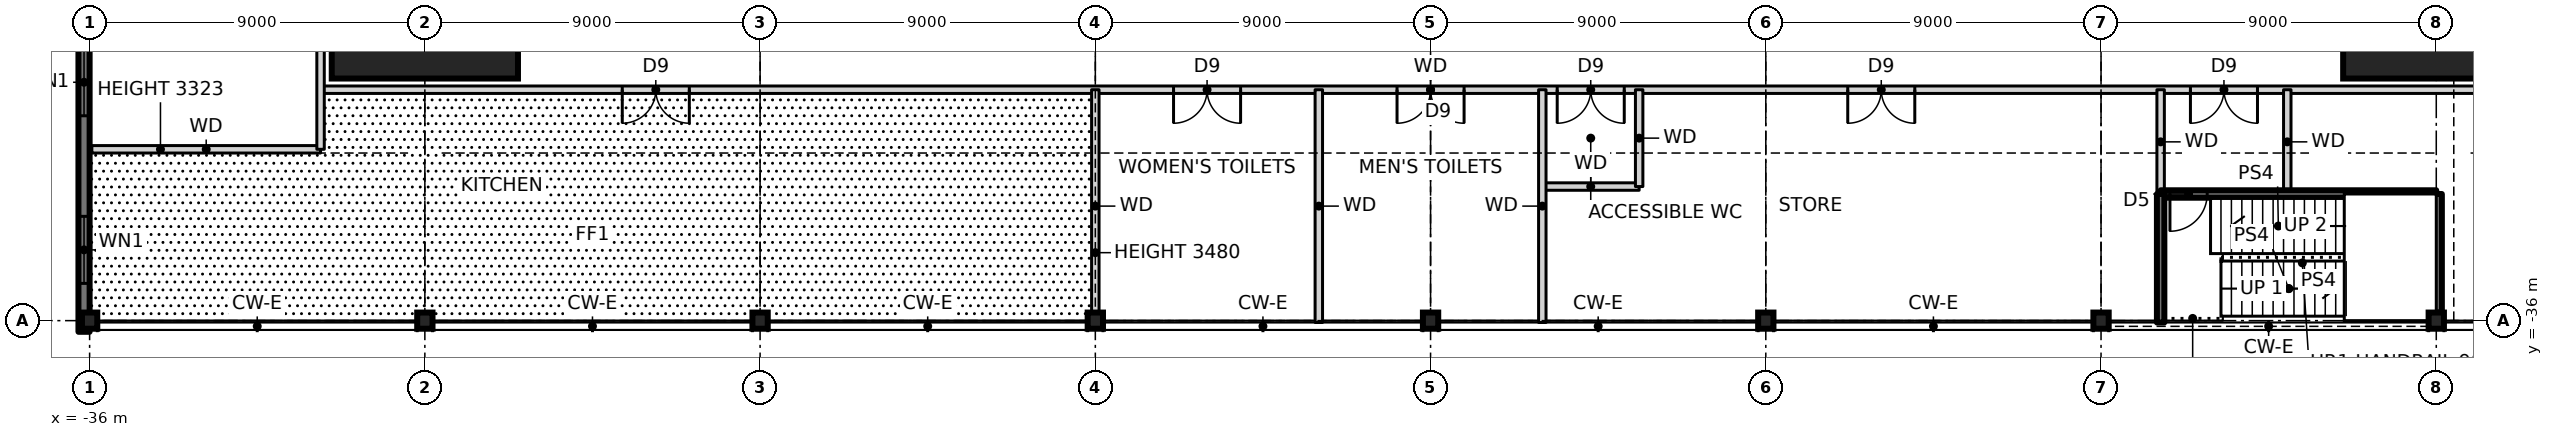
"""IFC4 building model, lengths in metres.
Left out: names, types, materials, properties, quantities, classifications, styles, units other than length and angle.
Written with IfcOpenShell. Run it as: python <this file> out.ifc"""

import sys

from ifc_helpers import new_model, si_unit, direction, frame, frame_2d, origin, origin_2d, place, context, subcontext, project, spatial, rectangle, i_section, extrude, element, fill, save


model = new_model("IFC4")
c1 = context("Model", 3, precision=1e-05, world=origin(), true_north=direction((0.0, 1.0)))
c2 = subcontext(c1, "Body", "Model", "MODEL_VIEW")
j1 = project(units=[si_unit("LENGTHUNIT", "METRE"), si_unit("PLANEANGLEUNIT", "RADIAN")], contexts=[c1])
p1 = place(None, origin())
s1 = spatial("IfcSite", under=j1, at=p1, CompositionType="ELEMENT")
p2 = place(p1, origin())
s2 = spatial("IfcBuilding", under=s1, at=p2, CompositionType="ELEMENT")
p3 = place(p2, frame((0.0, 0.0, 6.0)))
s3 = spatial("IfcBuildingStorey", under=s2, at=p3, CompositionType="ELEMENT", Elevation=6.0)
for number, where, z_axis, x_axis in (
    (1, (-27.0, -27.0, 0.0), (0.0, 0.0, 1.0), (1.0, 0.0, 0.0)),
    (2, (27.0, -27.0, 0.0), (0.0, 0.0, 1.0), (1.0, 0.0, 0.0)),
):
    element("IfcColumn", number, at=place(p3, frame(where, z_axis=z_axis, x_axis=x_axis)), inside=s3, PredefinedType="COLUMN", context=c2, shape_type="SweptSolid", body=[
        extrude(rectangle(XDim=5.0, YDim=5.0, at=origin_2d()), origin(), (0.0, 0.0, 1.0), 4.5),
        extrude(i_section(OverallWidth=0.478, OverallDepth=0.599, WebThickness=0.1, FlangeThickness=0.14, at=origin_2d()), origin(), (0.0, 0.0, 1.0), 4.5),
    ])
for number, where, z_axis, x_axis in (
    (3, (-36.0, -36.0, 0.0), (0.0, 0.0, 1.0), (1.0, 0.0, 0.0)),
    (4, (-27.0, -36.0, 0.0), (0.0, 0.0, 1.0), (1.0, 0.0, 0.0)),
    (5, (-18.0, -36.0, 0.0), (0.0, 0.0, 1.0), (1.0, 0.0, 0.0)),
    (6, (-9.0, -36.0, 0.0), (0.0, 0.0, 1.0), (1.0, 0.0, 0.0)),
    (7, (0.0, -36.0, 0.0), (0.0, 0.0, 1.0), (1.0, 0.0, 0.0)),
    (8, (9.0, -36.0, 0.0), (0.0, 0.0, 1.0), (1.0, 0.0, 0.0)),
    (9, (18.0, -36.0, 0.0), (0.0, 0.0, 1.0), (1.0, 0.0, 0.0)),
    (10, (27.0, -36.0, 0.0), (0.0, 0.0, 1.0), (1.0, 0.0, 0.0)),
):
    element("IfcColumn", number, at=place(p3, frame(where, z_axis=z_axis, x_axis=x_axis)), inside=s3, PredefinedType="COLUMN", context=c2, shape_type="SweptSolid", body=[
        extrude(i_section(OverallWidth=0.411, OverallDepth=0.434, WebThickness=0.036, FlangeThickness=0.057, at=origin_2d()), origin(), (0.0, 0.0, 1.0), 4.5),
    ])
p4 = place(p3, frame((-36.15, 36.3, -0.25), z_axis=(0.0, 0.0, 1.0), x_axis=(0.0, -1.0, 0.0)))
e11 = element("IfcWall", 11, at=p4, inside=s3, PredefinedType="SOLIDWALL", context=c2, shape_type="SweptSolid", body=[
    extrude(rectangle(XDim=72.6, YDim=0.3, at=frame_2d((36.3, 0.0))), origin(), (0.0, 0.0, 1.0), 3.73),
])
p5 = place(p4, frame((2.0, 0.0, 1.15)))
e12 = element("IfcOpeningElement", 12, at=p5, cuts=e11, PredefinedType="OPENING", context=c2, shape_type="SweptSolid", body=[
    extrude(rectangle(XDim=1.8, YDim=2.4, at=frame_2d((0.9, 1.2))), frame((0.0, 0.16, 0.0), z_axis=(0.0, -1.0, 0.0), x_axis=(1.0, 0.0, 0.0)), (0.0, 0.0, 1.0), 0.32),
])
p6 = place(p4, frame((6.5, 0.0, 1.15)))
e13 = element("IfcOpeningElement", 13, at=p6, cuts=e11, PredefinedType="OPENING", context=c2, shape_type="SweptSolid", body=[
    extrude(rectangle(XDim=1.8, YDim=2.4, at=frame_2d((0.9, 1.2))), frame((0.0, 0.16, 0.0), z_axis=(0.0, -1.0, 0.0), x_axis=(1.0, 0.0, 0.0)), (0.0, 0.0, 1.0), 0.32),
])
p7 = place(p4, frame((11.0, 0.0, 1.15)))
e14 = element("IfcOpeningElement", 14, at=p7, cuts=e11, PredefinedType="OPENING", context=c2, shape_type="SweptSolid", body=[
    extrude(rectangle(XDim=1.8, YDim=2.4, at=frame_2d((0.9, 1.2))), frame((0.0, 0.16, 0.0), z_axis=(0.0, -1.0, 0.0), x_axis=(1.0, 0.0, 0.0)), (0.0, 0.0, 1.0), 0.32),
])
p8 = place(p4, frame((15.5, 0.0, 1.15)))
e15 = element("IfcOpeningElement", 15, at=p8, cuts=e11, PredefinedType="OPENING", context=c2, shape_type="SweptSolid", body=[
    extrude(rectangle(XDim=1.8, YDim=2.4, at=frame_2d((0.9, 1.2))), frame((0.0, 0.16, 0.0), z_axis=(0.0, -1.0, 0.0), x_axis=(1.0, 0.0, 0.0)), (0.0, 0.0, 1.0), 0.32),
])
p9 = place(p4, frame((20.0, 0.0, 1.15)))
e16 = element("IfcOpeningElement", 16, at=p9, cuts=e11, PredefinedType="OPENING", context=c2, shape_type="SweptSolid", body=[
    extrude(rectangle(XDim=1.8, YDim=2.4, at=frame_2d((0.9, 1.2))), frame((0.0, 0.16, 0.0), z_axis=(0.0, -1.0, 0.0), x_axis=(1.0, 0.0, 0.0)), (0.0, 0.0, 1.0), 0.32),
])
p10 = place(p4, frame((24.5, 0.0, 1.15)))
e17 = element("IfcOpeningElement", 17, at=p10, cuts=e11, PredefinedType="OPENING", context=c2, shape_type="SweptSolid", body=[
    extrude(rectangle(XDim=1.8, YDim=2.4, at=frame_2d((0.9, 1.2))), frame((0.0, 0.16, 0.0), z_axis=(0.0, -1.0, 0.0), x_axis=(1.0, 0.0, 0.0)), (0.0, 0.0, 1.0), 0.32),
])
p11 = place(p4, frame((29.0, 0.0, 1.15)))
e18 = element("IfcOpeningElement", 18, at=p11, cuts=e11, PredefinedType="OPENING", context=c2, shape_type="SweptSolid", body=[
    extrude(rectangle(XDim=1.8, YDim=2.4, at=frame_2d((0.9, 1.2))), frame((0.0, 0.16, 0.0), z_axis=(0.0, -1.0, 0.0), x_axis=(1.0, 0.0, 0.0)), (0.0, 0.0, 1.0), 0.32),
])
p12 = place(p4, frame((42.5, 0.0, 1.15)))
e19 = element("IfcOpeningElement", 19, at=p12, cuts=e11, PredefinedType="OPENING", context=c2, shape_type="SweptSolid", body=[
    extrude(rectangle(XDim=1.8, YDim=2.4, at=frame_2d((0.9, 1.2))), frame((0.0, 0.16, 0.0), z_axis=(0.0, -1.0, 0.0), x_axis=(1.0, 0.0, 0.0)), (0.0, 0.0, 1.0), 0.32),
])
p13 = place(p4, frame((47.0, 0.0, 1.15)))
e20 = element("IfcOpeningElement", 20, at=p13, cuts=e11, PredefinedType="OPENING", context=c2, shape_type="SweptSolid", body=[
    extrude(rectangle(XDim=1.8, YDim=2.4, at=frame_2d((0.9, 1.2))), frame((0.0, 0.16, 0.0), z_axis=(0.0, -1.0, 0.0), x_axis=(1.0, 0.0, 0.0)), (0.0, 0.0, 1.0), 0.32),
])
p14 = place(p4, frame((51.5, 0.0, 1.15)))
e21 = element("IfcOpeningElement", 21, at=p14, cuts=e11, PredefinedType="OPENING", context=c2, shape_type="SweptSolid", body=[
    extrude(rectangle(XDim=1.8, YDim=2.4, at=frame_2d((0.9, 1.2))), frame((0.0, 0.16, 0.0), z_axis=(0.0, -1.0, 0.0), x_axis=(1.0, 0.0, 0.0)), (0.0, 0.0, 1.0), 0.32),
])
p15 = place(p4, frame((56.0, 0.0, 1.15)))
e22 = element("IfcOpeningElement", 22, at=p15, cuts=e11, PredefinedType="OPENING", context=c2, shape_type="SweptSolid", body=[
    extrude(rectangle(XDim=1.8, YDim=2.4, at=frame_2d((0.9, 1.2))), frame((0.0, 0.16, 0.0), z_axis=(0.0, -1.0, 0.0), x_axis=(1.0, 0.0, 0.0)), (0.0, 0.0, 1.0), 0.32),
])
p16 = place(p4, frame((60.5, 0.0, 1.15)))
e23 = element("IfcOpeningElement", 23, at=p16, cuts=e11, PredefinedType="OPENING", context=c2, shape_type="SweptSolid", body=[
    extrude(rectangle(XDim=1.8, YDim=2.4, at=frame_2d((0.9, 1.2))), frame((0.0, 0.16, 0.0), z_axis=(0.0, -1.0, 0.0), x_axis=(1.0, 0.0, 0.0)), (0.0, 0.0, 1.0), 0.32),
])
p17 = place(p4, frame((65.0, 0.0, 1.15)))
e24 = element("IfcOpeningElement", 24, at=p17, cuts=e11, PredefinedType="OPENING", context=c2, shape_type="SweptSolid", body=[
    extrude(rectangle(XDim=1.8, YDim=2.4, at=frame_2d((0.9, 1.2))), frame((0.0, 0.16, 0.0), z_axis=(0.0, -1.0, 0.0), x_axis=(1.0, 0.0, 0.0)), (0.0, 0.0, 1.0), 0.32),
])
p18 = place(p4, frame((69.5, 0.0, 1.15)))
e25 = element("IfcOpeningElement", 25, at=p18, cuts=e11, PredefinedType="OPENING", context=c2, shape_type="SweptSolid", body=[
    extrude(rectangle(XDim=1.8, YDim=2.4, at=frame_2d((0.9, 1.2))), frame((0.0, 0.16, 0.0), z_axis=(0.0, -1.0, 0.0), x_axis=(1.0, 0.0, 0.0)), (0.0, 0.0, 1.0), 0.32),
])
p19 = place(p2, origin())
s4 = spatial("IfcBuildingStorey", under=s2, at=p19, CompositionType="ELEMENT", Elevation=0.0)
p20 = place(p19, frame((27.506, -36.25, -0.15), z_axis=(0.0, 0.0, 1.0), x_axis=(0.0, -1.0, 0.0)))
e26 = element("IfcWall", 26, at=p20, inside=s4, PredefinedType="SOLIDWALL", context=c2, shape_type="SweptSolid", body=[
    extrude(rectangle(XDim=3.05, YDim=0.6, at=frame_2d((1.525, 0.0))), origin(), (0.0, 0.0, 1.0), 9.15),
])
p21 = place(p3, frame((19.6, -32.6, 0.0), z_axis=(0.0, 0.0, 1.0), x_axis=(1.0, 0.0, 0.0)))
e27 = element("IfcWall", 27, at=p21, inside=s3, PredefinedType="SOLIDWALL", context=c2, shape_type="SweptSolid", body=[
    extrude(rectangle(XDim=7.4, YDim=0.2, at=frame_2d((3.7, 0.0))), origin(), (0.0, 0.0, 1.0), 4.5),
])
p22 = place(p21, frame((0.25, 0.0, 0.0)))
e28 = element("IfcOpeningElement", 28, at=p22, cuts=e27, PredefinedType="OPENING", context=c2, shape_type="SweptSolid", body=[
    extrude(rectangle(XDim=1.0, YDim=2.1, at=frame_2d((0.5, 1.05))), frame((0.0, 0.11, 0.0), z_axis=(0.0, -1.0, 0.0), x_axis=(1.0, 0.0, 0.0)), (0.0, 0.0, 1.0), 0.22),
])
p23 = place(p3, frame((3.0, -32.4, 0.0), z_axis=(0.0, 0.0, 1.0), x_axis=(1.0, 0.0, 0.0)))
e29 = element("IfcWall", 29, at=p23, inside=s3, PredefinedType="SOLIDWALL", context=c2, shape_type="SweptSolid", body=[
    extrude(rectangle(XDim=2.6, YDim=0.2, at=frame_2d((1.3, 0.0))), origin(), (0.0, 0.0, 1.0), 4.25),
])
p24 = place(p3, frame((-35.94, -31.4, 0.0), z_axis=(0.0, 0.0, 1.0), x_axis=(1.0, 0.0, 0.0)))
e30 = element("IfcWall", 30, at=p24, inside=s3, PredefinedType="SOLIDWALL", context=c2, shape_type="SweptSolid", body=[
    extrude(rectangle(XDim=6.14, YDim=0.2, at=frame_2d((3.07, 0.0))), origin(), (0.0, 0.0, 1.0), 3.323),
])
p25 = place(p3, frame((-29.8, -29.8, 0.0), z_axis=(0.0, 0.0, 1.0), x_axis=(1.0, 0.0, 0.0)))
e31 = element("IfcWall", 31, at=p25, inside=s3, PredefinedType="SOLIDWALL", context=c2, shape_type="SweptSolid", body=[
    extrude(rectangle(XDim=59.6, YDim=0.2, at=frame_2d((29.8, 0.0))), origin(), (0.0, 0.0, 1.0), 4.25),
])
p26 = place(p25, frame((8.1, 0.0, 0.0)))
e32 = element("IfcOpeningElement", 32, at=p26, cuts=e31, PredefinedType="OPENING", context=c2, shape_type="SweptSolid", body=[
    extrude(rectangle(XDim=1.8, YDim=2.1, at=frame_2d((0.9, 1.05))), frame((0.0, 0.11, 0.0), z_axis=(0.0, -1.0, 0.0), x_axis=(1.0, 0.0, 0.0)), (0.0, 0.0, 1.0), 0.22),
])
p27 = place(p25, frame((22.9, 0.0, 0.0)))
e33 = element("IfcOpeningElement", 33, at=p27, cuts=e31, PredefinedType="OPENING", context=c2, shape_type="SweptSolid", body=[
    extrude(rectangle(XDim=1.8, YDim=2.1, at=frame_2d((0.9, 1.05))), frame((0.0, 0.11, 0.0), z_axis=(0.0, -1.0, 0.0), x_axis=(1.0, 0.0, 0.0)), (0.0, 0.0, 1.0), 0.22),
])
p28 = place(p25, frame((28.9, 0.0, 0.0)))
e34 = element("IfcOpeningElement", 34, at=p28, cuts=e31, PredefinedType="OPENING", context=c2, shape_type="SweptSolid", body=[
    extrude(rectangle(XDim=1.8, YDim=2.1, at=frame_2d((0.9, 1.05))), frame((0.0, 0.11, 0.0), z_axis=(0.0, -1.0, 0.0), x_axis=(1.0, 0.0, 0.0)), (0.0, 0.0, 1.0), 0.22),
])
p29 = place(p25, frame((33.2, 0.0, 0.0)))
e35 = element("IfcOpeningElement", 35, at=p29, cuts=e31, PredefinedType="OPENING", context=c2, shape_type="SweptSolid", body=[
    extrude(rectangle(XDim=1.8, YDim=2.1, at=frame_2d((0.9, 1.05))), frame((0.0, 0.11, 0.0), z_axis=(0.0, -1.0, 0.0), x_axis=(1.0, 0.0, 0.0)), (0.0, 0.0, 1.0), 0.22),
])
p30 = place(p25, frame((41.0, 0.0, 0.0)))
e36 = element("IfcOpeningElement", 36, at=p30, cuts=e31, PredefinedType="OPENING", context=c2, shape_type="SweptSolid", body=[
    extrude(rectangle(XDim=1.8, YDim=2.1, at=frame_2d((0.9, 1.05))), frame((0.0, 0.11, 0.0), z_axis=(0.0, -1.0, 0.0), x_axis=(1.0, 0.0, 0.0)), (0.0, 0.0, 1.0), 0.22),
])
p31 = place(p25, frame((50.2, 0.0, 0.0)))
e37 = element("IfcOpeningElement", 37, at=p31, cuts=e31, PredefinedType="OPENING", context=c2, shape_type="SweptSolid", body=[
    extrude(rectangle(XDim=1.8, YDim=2.1, at=frame_2d((0.9, 1.05))), frame((0.0, 0.11, 0.0), z_axis=(0.0, -1.0, 0.0), x_axis=(1.0, 0.0, 0.0)), (0.0, 0.0, 1.0), 0.22),
])
p32 = place(p3, frame((27.0, -35.783, 0.0), z_axis=(0.0, 0.0, 1.0), x_axis=(0.0, 1.0, 0.0)))
e38 = element("IfcWall", 38, at=p32, inside=s3, PredefinedType="SOLIDWALL", context=c2, shape_type="SweptSolid", body=[
    extrude(rectangle(XDim=3.183, YDim=0.3, at=frame_2d((1.591, 0.0))), origin(), (0.0, 0.0, 1.0), 4.5),
])
p33 = place(p3, frame((23.0, -32.6, 0.0), z_axis=(0.0, 0.0, 1.0), x_axis=(0.0, 1.0, 0.0)))
e39 = element("IfcWall", 39, at=p33, inside=s3, PredefinedType="SOLIDWALL", context=c2, shape_type="SweptSolid", body=[
    extrude(rectangle(XDim=2.8, YDim=0.2, at=frame_2d((1.4, 0.0))), origin(), (0.0, 0.0, 1.0), 4.25),
])
p34 = place(p3, frame((19.6, -36.05, 0.0), z_axis=(0.0, 0.0, 1.0), x_axis=(0.0, 1.0, 0.0)))
e40 = element("IfcWall", 40, at=p34, inside=s3, PredefinedType="SOLIDWALL", context=c2, shape_type="SweptSolid", body=[
    extrude(rectangle(XDim=3.45, YDim=0.2, at=frame_2d((1.725, 0.0))), origin(), (0.0, 0.0, 1.0), 4.5),
])
p35 = place(p3, frame((19.6, -32.6, 0.0), z_axis=(0.0, 0.0, 1.0), x_axis=(0.0, 1.0, 0.0)))
e41 = element("IfcWall", 41, at=p35, inside=s3, PredefinedType="SOLIDWALL", context=c2, shape_type="SweptSolid", body=[
    extrude(rectangle(XDim=2.8, YDim=0.2, at=frame_2d((1.4, 0.0))), origin(), (0.0, 0.0, 1.0), 4.25),
])
p36 = place(p3, frame((5.6, -32.4, 0.0), z_axis=(0.0, 0.0, 1.0), x_axis=(0.0, 1.0, 0.0)))
e42 = element("IfcWall", 42, at=p36, inside=s3, PredefinedType="SOLIDWALL", context=c2, shape_type="SweptSolid", body=[
    extrude(rectangle(XDim=2.6, YDim=0.2, at=frame_2d((1.3, 0.0))), origin(), (0.0, 0.0, 1.0), 4.25),
])
for number, where, z_axis, x_axis in (
    (43, (3.0, -36.05, 0.0), (0.0, 0.0, 1.0), (0.0, 1.0, 0.0)),
    (44, (-3.0, -36.05, 0.0), (0.0, 0.0, 1.0), (0.0, 1.0, 0.0)),
):
    element("IfcWall", number, at=place(p3, frame(where, z_axis=z_axis, x_axis=x_axis)), inside=s3, PredefinedType="SOLIDWALL", context=c2, shape_type="SweptSolid", body=[
        extrude(rectangle(XDim=6.25, YDim=0.2, at=frame_2d((3.125, 0.0))), origin(), (0.0, 0.0, 1.0), 4.25),
    ])
p37 = place(p3, frame((-9.0, -36.05, 0.0), z_axis=(0.0, 0.0, 1.0), x_axis=(0.0, 1.0, 0.0)))
e45 = element("IfcWall", 45, at=p37, inside=s3, PredefinedType="SOLIDWALL", context=c2, shape_type="SweptSolid", body=[
    extrude(rectangle(XDim=6.25, YDim=0.2, at=frame_2d((3.125, 0.0))), origin(), (0.0, 0.0, 1.0), 3.48),
])
p38 = place(p3, frame((-29.8, -31.4, 0.0), z_axis=(0.0, 0.0, 1.0), x_axis=(0.0, 1.0, 0.0)))
e46 = element("IfcWall", 46, at=p38, inside=s3, PredefinedType="SOLIDWALL", context=c2, shape_type="SweptSolid", body=[
    extrude(rectangle(XDim=62.55, YDim=0.2, at=frame_2d((31.275, 0.0))), origin(), (0.0, 0.0, 1.0), 4.25),
])
p39 = place(p38, frame((8.9, 0.0, 0.0)))
e47 = element("IfcOpeningElement", 47, at=p39, cuts=e46, PredefinedType="OPENING", context=c2, shape_type="SweptSolid", body=[
    extrude(rectangle(XDim=1.8, YDim=2.1, at=frame_2d((0.9, 1.05))), frame((0.0, 0.11, 0.0), z_axis=(0.0, -1.0, 0.0), x_axis=(1.0, 0.0, 0.0)), (0.0, 0.0, 1.0), 0.22),
])
p40 = place(p38, frame((19.3, 0.0, 0.0)))
e48 = element("IfcOpeningElement", 48, at=p40, cuts=e46, PredefinedType="OPENING", context=c2, shape_type="SweptSolid", body=[
    extrude(rectangle(XDim=1.8, YDim=2.1, at=frame_2d((0.9, 1.05))), frame((0.0, 0.11, 0.0), z_axis=(0.0, -1.0, 0.0), x_axis=(1.0, 0.0, 0.0)), (0.0, 0.0, 1.0), 0.22),
])
p41 = place(p38, frame((24.15, 0.0, 0.0)))
e49 = element("IfcOpeningElement", 49, at=p41, cuts=e46, PredefinedType="OPENING", context=c2, shape_type="SweptSolid", body=[
    extrude(rectangle(XDim=1.8, YDim=2.1, at=frame_2d((0.9, 1.05))), frame((0.0, 0.11, 0.0), z_axis=(0.0, -1.0, 0.0), x_axis=(1.0, 0.0, 0.0)), (0.0, 0.0, 1.0), 0.22),
])
p42 = place(p38, frame((30.5, 0.0, 0.0)))
e50 = element("IfcOpeningElement", 50, at=p42, cuts=e46, PredefinedType="OPENING", context=c2, shape_type="SweptSolid", body=[
    extrude(rectangle(XDim=1.8, YDim=2.1, at=frame_2d((0.9, 1.05))), frame((0.0, 0.11, 0.0), z_axis=(0.0, -1.0, 0.0), x_axis=(1.0, 0.0, 0.0)), (0.0, 0.0, 1.0), 0.22),
])
p43 = place(p38, frame((36.85, 0.0, 0.0)))
e51 = element("IfcOpeningElement", 51, at=p43, cuts=e46, PredefinedType="OPENING", context=c2, shape_type="SweptSolid", body=[
    extrude(rectangle(XDim=1.8, YDim=2.1, at=frame_2d((0.9, 1.05))), frame((0.0, 0.11, 0.0), z_axis=(0.0, -1.0, 0.0), x_axis=(1.0, 0.0, 0.0)), (0.0, 0.0, 1.0), 0.22),
])
p44 = place(p38, frame((51.3, 0.0, 0.0)))
e52 = element("IfcOpeningElement", 52, at=p44, cuts=e46, PredefinedType="OPENING", context=c2, shape_type="SweptSolid", body=[
    extrude(rectangle(XDim=1.8, YDim=2.1, at=frame_2d((0.9, 1.05))), frame((0.0, 0.11, 0.0), z_axis=(0.0, -1.0, 0.0), x_axis=(1.0, 0.0, 0.0)), (0.0, 0.0, 1.0), 0.22),
])
p45 = place(p17, origin())
e53 = element("IfcWindow", 53, at=p45, inside=s3, PartitioningType="SINGLE_PANEL", PredefinedType="WINDOW", context=c2, shape_type="SweptSolid", body=[
    extrude(rectangle(XDim=1.8, YDim=2.4, at=frame_2d((0.9, 1.2))), frame((0.0, 0.03, 0.0), z_axis=(0.0, -1.0, 0.0), x_axis=(1.0, 0.0, 0.0)), (0.0, 0.0, 1.0), 0.06),
])
fill(e24, e53)
p46 = place(p18, origin())
e54 = element("IfcWindow", 54, at=p46, inside=s3, PartitioningType="SINGLE_PANEL", PredefinedType="WINDOW", context=c2, shape_type="SweptSolid", body=[
    extrude(rectangle(XDim=1.8, YDim=2.4, at=frame_2d((0.9, 1.2))), frame((0.0, 0.03, 0.0), z_axis=(0.0, -1.0, 0.0), x_axis=(1.0, 0.0, 0.0)), (0.0, 0.0, 1.0), 0.06),
])
fill(e25, e54)
p47 = place(p26, frame((1.8, 0.0, 0.0), z_axis=(0.0, 0.0, 1.0), x_axis=(-1.0, 0.0, 0.0)))
e55 = element("IfcDoor", 55, at=p47, inside=s3, OperationType="DOUBLE_DOOR_SINGLE_SWING", PredefinedType="DOOR", context=c2, shape_type="SweptSolid", body=[
    extrude(rectangle(XDim=1.8, YDim=2.1, at=frame_2d((0.9, 1.05))), frame((0.0, 0.025, 0.0), z_axis=(0.0, -1.0, 0.0), x_axis=(1.0, 0.0, 0.0)), (0.0, 0.0, 1.0), 0.05),
])
fill(e32, e55)
p48 = place(p27, frame((1.8, 0.0, 0.0), z_axis=(0.0, 0.0, 1.0), x_axis=(-1.0, 0.0, 0.0)))
e56 = element("IfcDoor", 56, at=p48, inside=s3, OperationType="DOUBLE_DOOR_SINGLE_SWING", PredefinedType="DOOR", context=c2, shape_type="SweptSolid", body=[
    extrude(rectangle(XDim=1.8, YDim=2.1, at=frame_2d((0.9, 1.05))), frame((0.0, 0.025, 0.0), z_axis=(0.0, -1.0, 0.0), x_axis=(1.0, 0.0, 0.0)), (0.0, 0.0, 1.0), 0.05),
])
fill(e33, e56)
p49 = place(p28, frame((1.8, 0.0, 0.0), z_axis=(0.0, 0.0, 1.0), x_axis=(-1.0, 0.0, 0.0)))
e57 = element("IfcDoor", 57, at=p49, inside=s3, OperationType="DOUBLE_DOOR_SINGLE_SWING", PredefinedType="DOOR", context=c2, shape_type="SweptSolid", body=[
    extrude(rectangle(XDim=1.8, YDim=2.1, at=frame_2d((0.9, 1.05))), frame((0.0, 0.025, 0.0), z_axis=(0.0, -1.0, 0.0), x_axis=(1.0, 0.0, 0.0)), (0.0, 0.0, 1.0), 0.05),
])
fill(e34, e57)
p50 = place(p29, frame((1.8, 0.0, 0.0), z_axis=(0.0, 0.0, 1.0), x_axis=(-1.0, 0.0, 0.0)))
e58 = element("IfcDoor", 58, at=p50, inside=s3, OperationType="DOUBLE_DOOR_SINGLE_SWING", PredefinedType="DOOR", context=c2, shape_type="SweptSolid", body=[
    extrude(rectangle(XDim=1.8, YDim=2.1, at=frame_2d((0.9, 1.05))), frame((0.0, 0.025, 0.0), z_axis=(0.0, -1.0, 0.0), x_axis=(1.0, 0.0, 0.0)), (0.0, 0.0, 1.0), 0.05),
])
fill(e35, e58)
p51 = place(p30, frame((1.8, 0.0, 0.0), z_axis=(0.0, 0.0, 1.0), x_axis=(-1.0, 0.0, 0.0)))
e59 = element("IfcDoor", 59, at=p51, inside=s3, OperationType="DOUBLE_DOOR_SINGLE_SWING", PredefinedType="DOOR", context=c2, shape_type="SweptSolid", body=[
    extrude(rectangle(XDim=1.8, YDim=2.1, at=frame_2d((0.9, 1.05))), frame((0.0, 0.025, 0.0), z_axis=(0.0, -1.0, 0.0), x_axis=(1.0, 0.0, 0.0)), (0.0, 0.0, 1.0), 0.05),
])
fill(e36, e59)
p52 = place(p31, frame((1.8, 0.0, 0.0), z_axis=(0.0, 0.0, 1.0), x_axis=(-1.0, 0.0, 0.0)))
e60 = element("IfcDoor", 60, at=p52, inside=s3, OperationType="DOUBLE_DOOR_SINGLE_SWING", PredefinedType="DOOR", context=c2, shape_type="SweptSolid", body=[
    extrude(rectangle(XDim=1.8, YDim=2.1, at=frame_2d((0.9, 1.05))), frame((0.0, 0.025, 0.0), z_axis=(0.0, -1.0, 0.0), x_axis=(1.0, 0.0, 0.0)), (0.0, 0.0, 1.0), 0.05),
])
fill(e37, e60)
p53 = place(p22, frame((1.0, 0.0, 0.0), z_axis=(0.0, 0.0, 1.0), x_axis=(-1.0, 0.0, 0.0)))
e61 = element("IfcDoor", 61, at=p53, inside=s3, OperationType="SINGLE_SWING_RIGHT", PredefinedType="DOOR", context=c2, shape_type="SweptSolid", body=[
    extrude(rectangle(XDim=1.0, YDim=2.1, at=frame_2d((0.5, 1.05))), frame((0.0, 0.025, 0.0), z_axis=(0.0, -1.0, 0.0), x_axis=(1.0, 0.0, 0.0)), (0.0, 0.0, 1.0), 0.05),
])
fill(e28, e61)
save(model, sys.argv[1])
